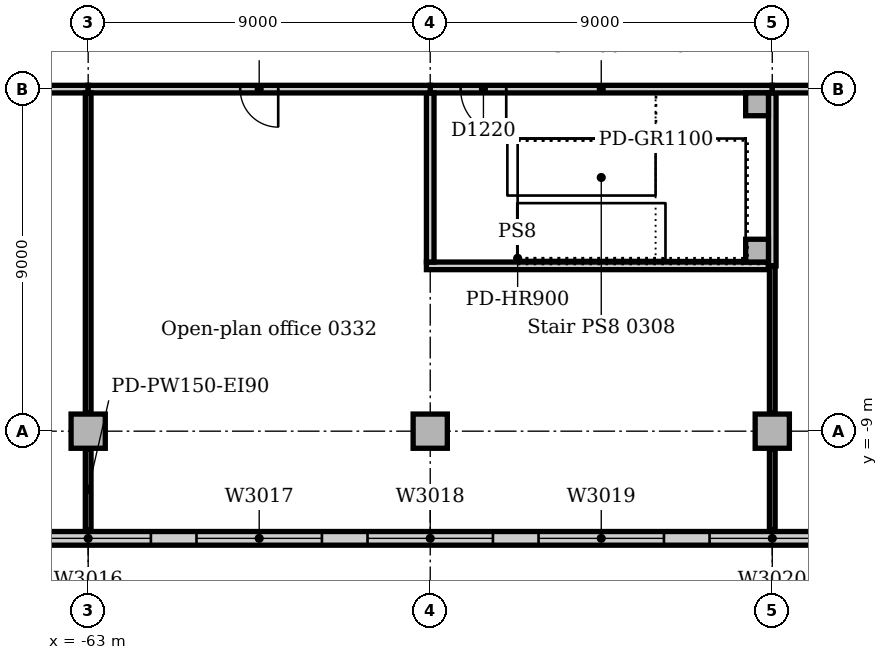
"""IFC4 building model, lengths in metres.
Left out: names, types, materials, properties, quantities, classifications, styles, units other than length and angle.
Written with IfcOpenShell. Run it as: python <this file> out.ifc"""

import sys

from ifc_helpers import new_model, si_unit, direction, frame, frame_2d, origin, origin_2d, place, context, subcontext, project, spatial, rectangle, extrude, element, fill, save


model = new_model("IFC4")
c1 = context("Model", 3, precision=1e-05, world=origin(), true_north=direction((0.0, 1.0)))
c2 = subcontext(c1, "Body", "Model", "MODEL_VIEW")
j1 = project(units=[si_unit("LENGTHUNIT", "METRE"), si_unit("PLANEANGLEUNIT", "RADIAN")], contexts=[c1])
p1 = place(None, origin())
s1 = spatial("IfcSite", under=j1, at=p1, CompositionType="ELEMENT")
p2 = place(p1, origin())
s2 = spatial("IfcBuilding", under=s1, at=p2, CompositionType="ELEMENT")
p3 = place(p2, frame((0.0, 0.0, 16.0)))
s3 = spatial("IfcBuildingStorey", under=s2, at=p3, CompositionType="ELEMENT", Elevation=16.0)
for number, where, z_axis, x_axis in (
    (1, (-63.0, -9.0, 0.0), (0.0, 0.0, 1.0), (1.0, 0.0, 0.0)),
    (2, (-54.0, -9.0, 0.0), (0.0, 0.0, 1.0), (1.0, 0.0, 0.0)),
    (3, (-45.0, -9.0, 0.0), (0.0, 0.0, 1.0), (1.0, 0.0, 0.0)),
):
    element("IfcColumn", number, at=place(p3, frame(where, z_axis=z_axis, x_axis=x_axis)), inside=s3, PredefinedType="COLUMN", context=c2, shape_type="SweptSolid", body=[
        extrude(rectangle(XDim=0.9, YDim=0.9, at=origin_2d()), origin(), (0.0, 0.0, 1.0), 4.7),
    ])
p4 = place(p3, frame((-81.0, -11.82, 0.0), z_axis=(0.0, 0.0, 1.0), x_axis=(1.0, 0.0, 0.0)))
e4 = element("IfcWall", 4, at=p4, inside=s3, PredefinedType="STANDARD", context=c2, shape_type="SweptSolid", body=[
    extrude(rectangle(XDim=144.0, YDim=0.36, at=frame_2d((72.0, 0.0))), origin(), (0.0, 0.0, 1.0), 4.7),
])
p5 = place(p4, frame((2.85, 0.0, 0.9)))
e5 = element("IfcOpeningElement", 5, at=p5, cuts=e4, PredefinedType="OPENING", context=c2, shape_type="SweptSolid", body=[
    extrude(rectangle(XDim=3.3, YDim=2.4, at=frame_2d((1.65, 1.2))), frame((0.0, 0.19, 0.0), z_axis=(0.0, -1.0, 0.0), x_axis=(1.0, 0.0, 0.0)), (0.0, 0.0, 1.0), 0.38),
])
p6 = place(p4, frame((7.35, 0.0, 0.9)))
e6 = element("IfcOpeningElement", 6, at=p6, cuts=e4, PredefinedType="OPENING", context=c2, shape_type="SweptSolid", body=[
    extrude(rectangle(XDim=3.3, YDim=2.4, at=frame_2d((1.65, 1.2))), frame((0.0, 0.19, 0.0), z_axis=(0.0, -1.0, 0.0), x_axis=(1.0, 0.0, 0.0)), (0.0, 0.0, 1.0), 0.38),
])
p7 = place(p4, frame((11.85, 0.0, 0.9)))
e7 = element("IfcOpeningElement", 7, at=p7, cuts=e4, PredefinedType="OPENING", context=c2, shape_type="SweptSolid", body=[
    extrude(rectangle(XDim=3.3, YDim=2.4, at=frame_2d((1.65, 1.2))), frame((0.0, 0.19, 0.0), z_axis=(0.0, -1.0, 0.0), x_axis=(1.0, 0.0, 0.0)), (0.0, 0.0, 1.0), 0.38),
])
p8 = place(p4, frame((16.35, 0.0, 0.9)))
e8 = element("IfcOpeningElement", 8, at=p8, cuts=e4, PredefinedType="OPENING", context=c2, shape_type="SweptSolid", body=[
    extrude(rectangle(XDim=3.3, YDim=2.4, at=frame_2d((1.65, 1.2))), frame((0.0, 0.19, 0.0), z_axis=(0.0, -1.0, 0.0), x_axis=(1.0, 0.0, 0.0)), (0.0, 0.0, 1.0), 0.38),
])
p9 = place(p4, frame((20.85, 0.0, 0.9)))
e9 = element("IfcOpeningElement", 9, at=p9, cuts=e4, PredefinedType="OPENING", context=c2, shape_type="SweptSolid", body=[
    extrude(rectangle(XDim=3.3, YDim=2.4, at=frame_2d((1.65, 1.2))), frame((0.0, 0.19, 0.0), z_axis=(0.0, -1.0, 0.0), x_axis=(1.0, 0.0, 0.0)), (0.0, 0.0, 1.0), 0.38),
])
p10 = place(p4, frame((25.35, 0.0, 0.9)))
e10 = element("IfcOpeningElement", 10, at=p10, cuts=e4, PredefinedType="OPENING", context=c2, shape_type="SweptSolid", body=[
    extrude(rectangle(XDim=3.3, YDim=2.4, at=frame_2d((1.65, 1.2))), frame((0.0, 0.19, 0.0), z_axis=(0.0, -1.0, 0.0), x_axis=(1.0, 0.0, 0.0)), (0.0, 0.0, 1.0), 0.38),
])
p11 = place(p4, frame((29.85, 0.0, 0.9)))
e11 = element("IfcOpeningElement", 11, at=p11, cuts=e4, PredefinedType="OPENING", context=c2, shape_type="SweptSolid", body=[
    extrude(rectangle(XDim=3.3, YDim=2.4, at=frame_2d((1.65, 1.2))), frame((0.0, 0.19, 0.0), z_axis=(0.0, -1.0, 0.0), x_axis=(1.0, 0.0, 0.0)), (0.0, 0.0, 1.0), 0.38),
])
p12 = place(p4, frame((34.35, 0.0, 0.9)))
e12 = element("IfcOpeningElement", 12, at=p12, cuts=e4, PredefinedType="OPENING", context=c2, shape_type="SweptSolid", body=[
    extrude(rectangle(XDim=3.3, YDim=2.4, at=frame_2d((1.65, 1.2))), frame((0.0, 0.19, 0.0), z_axis=(0.0, -1.0, 0.0), x_axis=(1.0, 0.0, 0.0)), (0.0, 0.0, 1.0), 0.38),
])
p13 = place(p4, frame((38.85, 0.0, 0.9)))
e13 = element("IfcOpeningElement", 13, at=p13, cuts=e4, PredefinedType="OPENING", context=c2, shape_type="SweptSolid", body=[
    extrude(rectangle(XDim=3.3, YDim=2.4, at=frame_2d((1.65, 1.2))), frame((0.0, 0.19, 0.0), z_axis=(0.0, -1.0, 0.0), x_axis=(1.0, 0.0, 0.0)), (0.0, 0.0, 1.0), 0.38),
])
p14 = place(p4, frame((43.35, 0.0, 0.9)))
e14 = element("IfcOpeningElement", 14, at=p14, cuts=e4, PredefinedType="OPENING", context=c2, shape_type="SweptSolid", body=[
    extrude(rectangle(XDim=3.3, YDim=2.4, at=frame_2d((1.65, 1.2))), frame((0.0, 0.19, 0.0), z_axis=(0.0, -1.0, 0.0), x_axis=(1.0, 0.0, 0.0)), (0.0, 0.0, 1.0), 0.38),
])
p15 = place(p4, frame((47.85, 0.0, 0.9)))
e15 = element("IfcOpeningElement", 15, at=p15, cuts=e4, PredefinedType="OPENING", context=c2, shape_type="SweptSolid", body=[
    extrude(rectangle(XDim=3.3, YDim=2.4, at=frame_2d((1.65, 1.2))), frame((0.0, 0.19, 0.0), z_axis=(0.0, -1.0, 0.0), x_axis=(1.0, 0.0, 0.0)), (0.0, 0.0, 1.0), 0.38),
])
p16 = place(p4, frame((52.35, 0.0, 0.9)))
e16 = element("IfcOpeningElement", 16, at=p16, cuts=e4, PredefinedType="OPENING", context=c2, shape_type="SweptSolid", body=[
    extrude(rectangle(XDim=3.3, YDim=2.4, at=frame_2d((1.65, 1.2))), frame((0.0, 0.19, 0.0), z_axis=(0.0, -1.0, 0.0), x_axis=(1.0, 0.0, 0.0)), (0.0, 0.0, 1.0), 0.38),
])
p17 = place(p4, frame((56.85, 0.0, 0.9)))
e17 = element("IfcOpeningElement", 17, at=p17, cuts=e4, PredefinedType="OPENING", context=c2, shape_type="SweptSolid", body=[
    extrude(rectangle(XDim=3.3, YDim=2.4, at=frame_2d((1.65, 1.2))), frame((0.0, 0.19, 0.0), z_axis=(0.0, -1.0, 0.0), x_axis=(1.0, 0.0, 0.0)), (0.0, 0.0, 1.0), 0.38),
])
p18 = place(p4, frame((61.35, 0.0, 0.9)))
e18 = element("IfcOpeningElement", 18, at=p18, cuts=e4, PredefinedType="OPENING", context=c2, shape_type="SweptSolid", body=[
    extrude(rectangle(XDim=3.3, YDim=2.4, at=frame_2d((1.65, 1.2))), frame((0.0, 0.19, 0.0), z_axis=(0.0, -1.0, 0.0), x_axis=(1.0, 0.0, 0.0)), (0.0, 0.0, 1.0), 0.38),
])
p19 = place(p4, frame((65.85, 0.0, 0.9)))
e19 = element("IfcOpeningElement", 19, at=p19, cuts=e4, PredefinedType="OPENING", context=c2, shape_type="SweptSolid", body=[
    extrude(rectangle(XDim=3.3, YDim=2.4, at=frame_2d((1.65, 1.2))), frame((0.0, 0.19, 0.0), z_axis=(0.0, -1.0, 0.0), x_axis=(1.0, 0.0, 0.0)), (0.0, 0.0, 1.0), 0.38),
])
p20 = place(p4, frame((70.35, 0.0, 0.9)))
e20 = element("IfcOpeningElement", 20, at=p20, cuts=e4, PredefinedType="OPENING", context=c2, shape_type="SweptSolid", body=[
    extrude(rectangle(XDim=3.3, YDim=2.4, at=frame_2d((1.65, 1.2))), frame((0.0, 0.19, 0.0), z_axis=(0.0, -1.0, 0.0), x_axis=(1.0, 0.0, 0.0)), (0.0, 0.0, 1.0), 0.38),
])
p21 = place(p4, frame((74.85, 0.0, 0.9)))
e21 = element("IfcOpeningElement", 21, at=p21, cuts=e4, PredefinedType="OPENING", context=c2, shape_type="SweptSolid", body=[
    extrude(rectangle(XDim=3.3, YDim=2.4, at=frame_2d((1.65, 1.2))), frame((0.0, 0.19, 0.0), z_axis=(0.0, -1.0, 0.0), x_axis=(1.0, 0.0, 0.0)), (0.0, 0.0, 1.0), 0.38),
])
p22 = place(p4, frame((79.35, 0.0, 0.9)))
e22 = element("IfcOpeningElement", 22, at=p22, cuts=e4, PredefinedType="OPENING", context=c2, shape_type="SweptSolid", body=[
    extrude(rectangle(XDim=3.3, YDim=2.4, at=frame_2d((1.65, 1.2))), frame((0.0, 0.19, 0.0), z_axis=(0.0, -1.0, 0.0), x_axis=(1.0, 0.0, 0.0)), (0.0, 0.0, 1.0), 0.38),
])
p23 = place(p4, frame((83.85, 0.0, 0.9)))
e23 = element("IfcOpeningElement", 23, at=p23, cuts=e4, PredefinedType="OPENING", context=c2, shape_type="SweptSolid", body=[
    extrude(rectangle(XDim=3.3, YDim=2.4, at=frame_2d((1.65, 1.2))), frame((0.0, 0.19, 0.0), z_axis=(0.0, -1.0, 0.0), x_axis=(1.0, 0.0, 0.0)), (0.0, 0.0, 1.0), 0.38),
])
p24 = place(p4, frame((88.35, 0.0, 0.9)))
e24 = element("IfcOpeningElement", 24, at=p24, cuts=e4, PredefinedType="OPENING", context=c2, shape_type="SweptSolid", body=[
    extrude(rectangle(XDim=3.3, YDim=2.4, at=frame_2d((1.65, 1.2))), frame((0.0, 0.19, 0.0), z_axis=(0.0, -1.0, 0.0), x_axis=(1.0, 0.0, 0.0)), (0.0, 0.0, 1.0), 0.38),
])
p25 = place(p4, frame((92.85, 0.0, 0.9)))
e25 = element("IfcOpeningElement", 25, at=p25, cuts=e4, PredefinedType="OPENING", context=c2, shape_type="SweptSolid", body=[
    extrude(rectangle(XDim=3.3, YDim=2.4, at=frame_2d((1.65, 1.2))), frame((0.0, 0.19, 0.0), z_axis=(0.0, -1.0, 0.0), x_axis=(1.0, 0.0, 0.0)), (0.0, 0.0, 1.0), 0.38),
])
p26 = place(p4, frame((97.35, 0.0, 0.9)))
e26 = element("IfcOpeningElement", 26, at=p26, cuts=e4, PredefinedType="OPENING", context=c2, shape_type="SweptSolid", body=[
    extrude(rectangle(XDim=3.3, YDim=2.4, at=frame_2d((1.65, 1.2))), frame((0.0, 0.19, 0.0), z_axis=(0.0, -1.0, 0.0), x_axis=(1.0, 0.0, 0.0)), (0.0, 0.0, 1.0), 0.38),
])
p27 = place(p4, frame((101.85, 0.0, 0.9)))
e27 = element("IfcOpeningElement", 27, at=p27, cuts=e4, PredefinedType="OPENING", context=c2, shape_type="SweptSolid", body=[
    extrude(rectangle(XDim=3.3, YDim=2.4, at=frame_2d((1.65, 1.2))), frame((0.0, 0.19, 0.0), z_axis=(0.0, -1.0, 0.0), x_axis=(1.0, 0.0, 0.0)), (0.0, 0.0, 1.0), 0.38),
])
p28 = place(p4, frame((106.35, 0.0, 0.9)))
e28 = element("IfcOpeningElement", 28, at=p28, cuts=e4, PredefinedType="OPENING", context=c2, shape_type="SweptSolid", body=[
    extrude(rectangle(XDim=3.3, YDim=2.4, at=frame_2d((1.65, 1.2))), frame((0.0, 0.19, 0.0), z_axis=(0.0, -1.0, 0.0), x_axis=(1.0, 0.0, 0.0)), (0.0, 0.0, 1.0), 0.38),
])
p29 = place(p4, frame((110.85, 0.0, 0.9)))
e29 = element("IfcOpeningElement", 29, at=p29, cuts=e4, PredefinedType="OPENING", context=c2, shape_type="SweptSolid", body=[
    extrude(rectangle(XDim=3.3, YDim=2.4, at=frame_2d((1.65, 1.2))), frame((0.0, 0.19, 0.0), z_axis=(0.0, -1.0, 0.0), x_axis=(1.0, 0.0, 0.0)), (0.0, 0.0, 1.0), 0.38),
])
p30 = place(p4, frame((115.35, 0.0, 0.9)))
e30 = element("IfcOpeningElement", 30, at=p30, cuts=e4, PredefinedType="OPENING", context=c2, shape_type="SweptSolid", body=[
    extrude(rectangle(XDim=3.3, YDim=2.4, at=frame_2d((1.65, 1.2))), frame((0.0, 0.19, 0.0), z_axis=(0.0, -1.0, 0.0), x_axis=(1.0, 0.0, 0.0)), (0.0, 0.0, 1.0), 0.38),
])
p31 = place(p4, frame((119.85, 0.0, 0.9)))
e31 = element("IfcOpeningElement", 31, at=p31, cuts=e4, PredefinedType="OPENING", context=c2, shape_type="SweptSolid", body=[
    extrude(rectangle(XDim=3.3, YDim=2.4, at=frame_2d((1.65, 1.2))), frame((0.0, 0.19, 0.0), z_axis=(0.0, -1.0, 0.0), x_axis=(1.0, 0.0, 0.0)), (0.0, 0.0, 1.0), 0.38),
])
p32 = place(p4, frame((124.35, 0.0, 0.9)))
e32 = element("IfcOpeningElement", 32, at=p32, cuts=e4, PredefinedType="OPENING", context=c2, shape_type="SweptSolid", body=[
    extrude(rectangle(XDim=3.3, YDim=2.4, at=frame_2d((1.65, 1.2))), frame((0.0, 0.19, 0.0), z_axis=(0.0, -1.0, 0.0), x_axis=(1.0, 0.0, 0.0)), (0.0, 0.0, 1.0), 0.38),
])
p33 = place(p4, frame((128.85, 0.0, 0.9)))
e33 = element("IfcOpeningElement", 33, at=p33, cuts=e4, PredefinedType="OPENING", context=c2, shape_type="SweptSolid", body=[
    extrude(rectangle(XDim=3.3, YDim=2.4, at=frame_2d((1.65, 1.2))), frame((0.0, 0.19, 0.0), z_axis=(0.0, -1.0, 0.0), x_axis=(1.0, 0.0, 0.0)), (0.0, 0.0, 1.0), 0.38),
])
p34 = place(p4, frame((133.35, 0.0, 0.9)))
e34 = element("IfcOpeningElement", 34, at=p34, cuts=e4, PredefinedType="OPENING", context=c2, shape_type="SweptSolid", body=[
    extrude(rectangle(XDim=3.3, YDim=2.4, at=frame_2d((1.65, 1.2))), frame((0.0, 0.19, 0.0), z_axis=(0.0, -1.0, 0.0), x_axis=(1.0, 0.0, 0.0)), (0.0, 0.0, 1.0), 0.38),
])
p35 = place(p4, frame((137.85, 0.0, 0.9)))
e35 = element("IfcOpeningElement", 35, at=p35, cuts=e4, PredefinedType="OPENING", context=c2, shape_type="SweptSolid", body=[
    extrude(rectangle(XDim=3.3, YDim=2.4, at=frame_2d((1.65, 1.2))), frame((0.0, 0.19, 0.0), z_axis=(0.0, -1.0, 0.0), x_axis=(1.0, 0.0, 0.0)), (0.0, 0.0, 1.0), 0.38),
])
for number, where, z_axis, x_axis in (
    (36, (-45.4, -4.25, 0.0), (0.0, 0.0, 1.0), (1.0, 0.0, 0.0)),
    (37, (-45.4, -0.4, 0.0), (0.0, 0.0, 1.0), (1.0, 0.0, 0.0)),
):
    element("IfcColumn", number, at=place(p3, frame(where, z_axis=z_axis, x_axis=x_axis)), inside=s3, PredefinedType="COLUMN", context=c2, shape_type="SweptSolid", body=[
        extrude(rectangle(XDim=0.6, YDim=0.6, at=origin_2d()), origin(), (0.0, 0.0, 1.0), 5.0),
    ])
p36 = place(p3, frame((-54.0, 0.0, 0.0), z_axis=(0.0, 0.0, 1.0), x_axis=(1.0, 0.0, 0.0)))
e38 = element("IfcWall", 38, at=p36, inside=s3, PredefinedType="SOLIDWALL", context=c2, shape_type="SweptSolid", body=[
    extrude(rectangle(XDim=9.0, YDim=0.2, at=frame_2d((4.5, 0.0))), origin(), (0.0, 0.0, 1.0), 4.7),
])
p37 = place(p36, frame((0.8, 0.0, 0.0)))
e39 = element("IfcOpeningElement", 39, at=p37, cuts=e38, PredefinedType="OPENING", context=c2, shape_type="SweptSolid", body=[
    extrude(rectangle(XDim=1.2, YDim=2.1, at=frame_2d((0.6, 1.05))), frame((0.0, 0.11, 0.0), z_axis=(0.0, -1.0, 0.0), x_axis=(1.0, 0.0, 0.0)), (0.0, 0.0, 1.0), 0.22),
])
p38 = place(p3, frame((-54.1, -4.65, 0.0), z_axis=(0.0, 0.0, 1.0), x_axis=(1.0, 0.0, 0.0)))
e40 = element("IfcWall", 40, at=p38, inside=s3, PredefinedType="SOLIDWALL", context=c2, shape_type="SweptSolid", body=[
    extrude(rectangle(XDim=9.0, YDim=0.2, at=frame_2d((4.5, 0.0))), origin(), (0.0, 0.0, 1.0), 4.7),
])
p39 = place(p3, frame((-54.0, -4.55, 0.0), z_axis=(0.0, 0.0, 1.0), x_axis=(0.0, 1.0, 0.0)))
e41 = element("IfcWall", 41, at=p39, inside=s3, PredefinedType="SOLIDWALL", context=c2, shape_type="SweptSolid", body=[
    extrude(rectangle(XDim=4.45, YDim=0.2, at=frame_2d((2.225, 0.0))), origin(), (0.0, 0.0, 1.0), 4.7),
])
p40 = place(p3, frame((-45.0, -4.65, 0.0), z_axis=(0.0, 0.0, 1.0), x_axis=(0.0, 1.0, 0.0)))
e42 = element("IfcWall", 42, at=p40, inside=s3, PredefinedType="SOLIDWALL", context=c2, shape_type="SweptSolid", body=[
    extrude(rectangle(XDim=4.55, YDim=0.2, at=frame_2d((2.275, 0.0))), origin(), (0.0, 0.0, 1.0), 4.7),
])
p41 = place(p3, frame((-71.53, 0.0, 0.0), z_axis=(0.0, 0.0, 1.0), x_axis=(1.0, 0.0, 0.0)))
e43 = element("IfcWall", 43, at=p41, inside=s3, PredefinedType="PARTITIONING", context=c2, shape_type="SweptSolid", body=[
    extrude(rectangle(XDim=8.53, YDim=0.2, at=frame_2d((4.265, 0.0))), origin(), (0.0, 0.0, 1.0), 4.7),
])
p42 = place(p41, frame((3.53, 0.0, 0.0)))
e44 = element("IfcOpeningElement", 44, at=p42, cuts=e43, PredefinedType="OPENING", context=c2, shape_type="SweptSolid", body=[
    extrude(rectangle(XDim=1.0, YDim=2.1, at=frame_2d((0.5, 1.05))), frame((0.0, 0.11, 0.0), z_axis=(0.0, -1.0, 0.0), x_axis=(1.0, 0.0, 0.0)), (0.0, 0.0, 1.0), 0.22),
])
p43 = place(p3, frame((-63.0, 0.0, 0.0), z_axis=(0.0, 0.0, 1.0), x_axis=(1.0, 0.0, 0.0)))
e45 = element("IfcWall", 45, at=p43, inside=s3, PredefinedType="PARTITIONING", context=c2, shape_type="SweptSolid", body=[
    extrude(rectangle(XDim=9.0, YDim=0.2, at=frame_2d((4.5, 0.0))), origin(), (0.0, 0.0, 1.0), 4.7),
])
p44 = place(p43, frame((4.0, 0.0, 0.0)))
e46 = element("IfcOpeningElement", 46, at=p44, cuts=e45, PredefinedType="OPENING", context=c2, shape_type="SweptSolid", body=[
    extrude(rectangle(XDim=1.0, YDim=2.1, at=frame_2d((0.5, 1.05))), frame((0.0, 0.11, 0.0), z_axis=(0.0, -1.0, 0.0), x_axis=(1.0, 0.0, 0.0)), (0.0, 0.0, 1.0), 0.22),
])
p45 = place(p3, frame((-45.0, 0.0, 0.0), z_axis=(0.0, 0.0, 1.0), x_axis=(1.0, 0.0, 0.0)))
e47 = element("IfcWall", 47, at=p45, inside=s3, PredefinedType="PARTITIONING", context=c2, shape_type="SweptSolid", body=[
    extrude(rectangle(XDim=9.0, YDim=0.2, at=frame_2d((4.5, 0.0))), origin(), (0.0, 0.0, 1.0), 4.7),
])
p46 = place(p45, frame((4.0, 0.0, 0.0)))
e48 = element("IfcOpeningElement", 48, at=p46, cuts=e47, PredefinedType="OPENING", context=c2, shape_type="SweptSolid", body=[
    extrude(rectangle(XDim=1.0, YDim=2.1, at=frame_2d((0.5, 1.05))), frame((0.0, 0.11, 0.0), z_axis=(0.0, -1.0, 0.0), x_axis=(1.0, 0.0, 0.0)), (0.0, 0.0, 1.0), 0.22),
])
p47 = place(p3, frame((-63.0, -11.6, 0.0), z_axis=(0.0, 0.0, 1.0), x_axis=(0.0, 1.0, 0.0)))
e49 = element("IfcWall", 49, at=p47, inside=s3, PredefinedType="PARTITIONING", context=c2, shape_type="SweptSolid", body=[
    extrude(rectangle(XDim=2.13, YDim=0.15, at=frame_2d((1.065, 0.0))), origin(), (0.0, 0.0, 1.0), 4.7),
])
p48 = place(p3, frame((-63.0, -8.53, 0.0), z_axis=(0.0, 0.0, 1.0), x_axis=(0.0, 1.0, 0.0)))
e50 = element("IfcWall", 50, at=p48, inside=s3, PredefinedType="PARTITIONING", context=c2, shape_type="SweptSolid", body=[
    extrude(rectangle(XDim=8.43, YDim=0.15, at=frame_2d((4.215, 0.0))), origin(), (0.0, 0.0, 1.0), 4.7),
])
p49 = place(p3, frame((-45.0, -11.6, 0.0), z_axis=(0.0, 0.0, 1.0), x_axis=(0.0, 1.0, 0.0)))
e51 = element("IfcWall", 51, at=p49, inside=s3, PredefinedType="PARTITIONING", context=c2, shape_type="SweptSolid", body=[
    extrude(rectangle(XDim=2.13, YDim=0.15, at=frame_2d((1.065, 0.0))), origin(), (0.0, 0.0, 1.0), 4.7),
])
p50 = place(p3, frame((-45.0, -8.53, 0.0), z_axis=(0.0, 0.0, 1.0), x_axis=(0.0, 1.0, 0.0)))
e52 = element("IfcWall", 52, at=p50, inside=s3, PredefinedType="PARTITIONING", context=c2, shape_type="SweptSolid", body=[
    extrude(rectangle(XDim=3.88, YDim=0.15, at=frame_2d((1.94, 0.0))), origin(), (0.0, 0.0, 1.0), 4.7),
])
p51 = place(p8, origin())
e53 = element("IfcWindow", 53, at=p51, inside=s3, PartitioningType="SINGLE_PANEL", PredefinedType="WINDOW", context=c2, shape_type="SweptSolid", body=[
    extrude(rectangle(XDim=3.3, YDim=2.4, at=frame_2d((1.65, 1.2))), frame((0.0, 0.13, 0.0), z_axis=(0.0, -1.0, 0.0), x_axis=(1.0, 0.0, 0.0)), (0.0, 0.0, 1.0), 0.06),
])
fill(e8, e53)
p52 = place(p9, origin())
e54 = element("IfcWindow", 54, at=p52, inside=s3, PartitioningType="SINGLE_PANEL", PredefinedType="WINDOW", context=c2, shape_type="SweptSolid", body=[
    extrude(rectangle(XDim=3.3, YDim=2.4, at=frame_2d((1.65, 1.2))), frame((0.0, 0.13, 0.0), z_axis=(0.0, -1.0, 0.0), x_axis=(1.0, 0.0, 0.0)), (0.0, 0.0, 1.0), 0.06),
])
fill(e9, e54)
p53 = place(p10, origin())
e55 = element("IfcWindow", 55, at=p53, inside=s3, PartitioningType="SINGLE_PANEL", PredefinedType="WINDOW", context=c2, shape_type="SweptSolid", body=[
    extrude(rectangle(XDim=3.3, YDim=2.4, at=frame_2d((1.65, 1.2))), frame((0.0, 0.13, 0.0), z_axis=(0.0, -1.0, 0.0), x_axis=(1.0, 0.0, 0.0)), (0.0, 0.0, 1.0), 0.06),
])
fill(e10, e55)
p54 = place(p11, origin())
e56 = element("IfcWindow", 56, at=p54, inside=s3, PartitioningType="SINGLE_PANEL", PredefinedType="WINDOW", context=c2, shape_type="SweptSolid", body=[
    extrude(rectangle(XDim=3.3, YDim=2.4, at=frame_2d((1.65, 1.2))), frame((0.0, 0.13, 0.0), z_axis=(0.0, -1.0, 0.0), x_axis=(1.0, 0.0, 0.0)), (0.0, 0.0, 1.0), 0.06),
])
fill(e11, e56)
p55 = place(p12, origin())
e57 = element("IfcWindow", 57, at=p55, inside=s3, PartitioningType="SINGLE_PANEL", PredefinedType="WINDOW", context=c2, shape_type="SweptSolid", body=[
    extrude(rectangle(XDim=3.3, YDim=2.4, at=frame_2d((1.65, 1.2))), frame((0.0, 0.13, 0.0), z_axis=(0.0, -1.0, 0.0), x_axis=(1.0, 0.0, 0.0)), (0.0, 0.0, 1.0), 0.06),
])
fill(e12, e57)
p56 = place(p44, frame((1.0, 0.0, 0.0), z_axis=(0.0, 0.0, 1.0), x_axis=(-1.0, 0.0, 0.0)))
e58 = element("IfcDoor", 58, at=p56, inside=s3, OperationType="SINGLE_SWING_LEFT", PredefinedType="DOOR", context=c2, shape_type="SweptSolid", body=[
    extrude(rectangle(XDim=1.0, YDim=2.1, at=frame_2d((0.5, 1.05))), frame((0.0, 0.025, 0.0), z_axis=(0.0, -1.0, 0.0), x_axis=(1.0, 0.0, 0.0)), (0.0, 0.0, 1.0), 0.05),
])
fill(e46, e58)
p57 = place(p37, frame((1.2, 0.0, 0.0), z_axis=(0.0, 0.0, 1.0), x_axis=(-1.0, 0.0, 0.0)))
e59 = element("IfcDoor", 59, at=p57, inside=s3, OperationType="SINGLE_SWING_LEFT", PredefinedType="DOOR", context=c2, shape_type="SweptSolid", body=[
    extrude(rectangle(XDim=1.2, YDim=2.1, at=frame_2d((0.6, 1.05))), frame((0.0, 0.025, 0.0), z_axis=(0.0, -1.0, 0.0), x_axis=(1.0, 0.0, 0.0)), (0.0, 0.0, 1.0), 0.05),
])
fill(e39, e59)
save(model, sys.argv[1])
